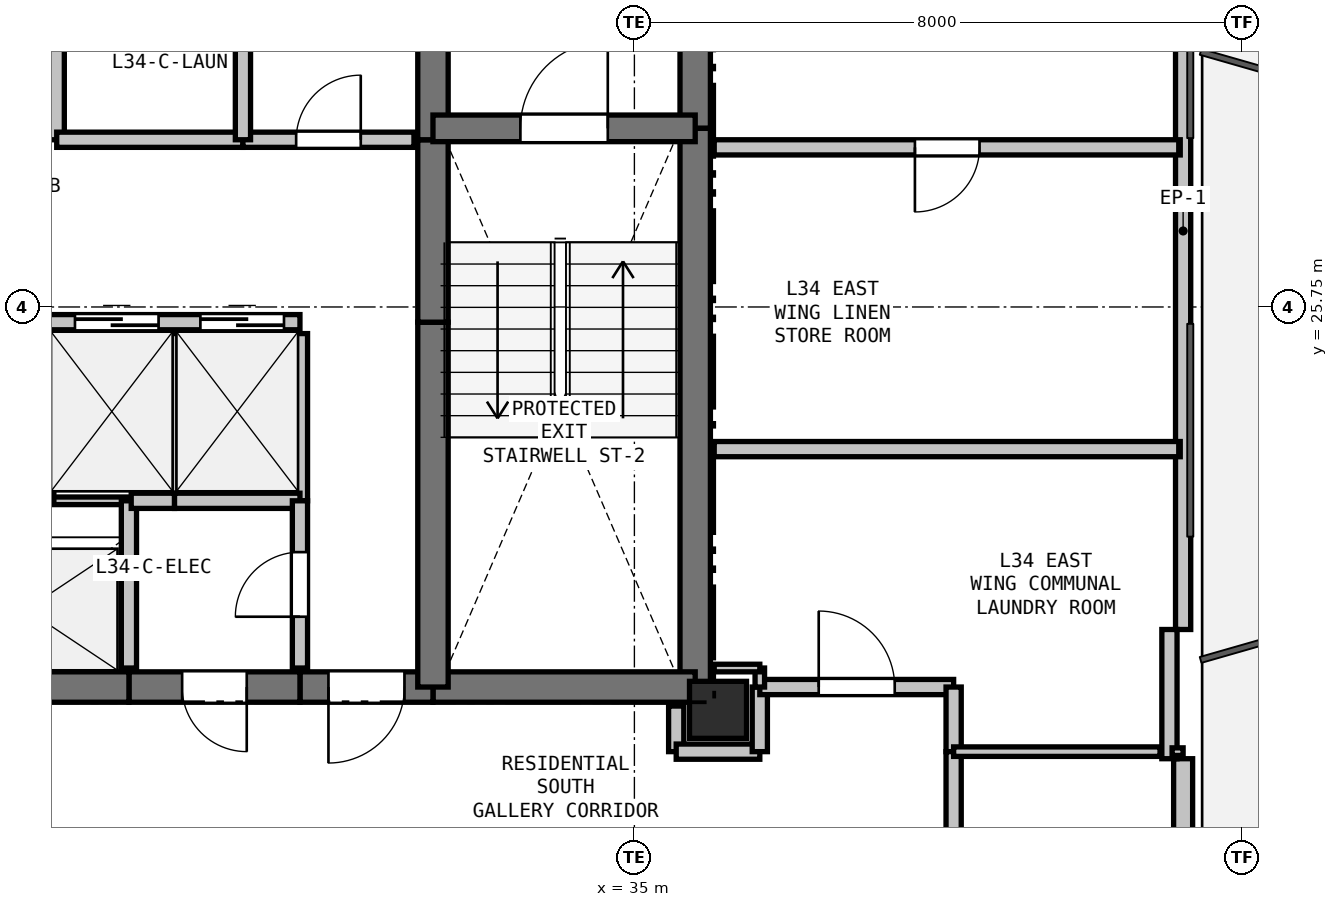
"""IFC4 building model, lengths in metres.
Left out: names, types, materials, properties, quantities, classifications, styles, units other than length and angle.
Written with IfcOpenShell. Run it as: python <this file> out.ifc"""

import sys

from ifc_helpers import new_model, si_unit, direction, frame, frame_2d, origin, origin_2d, place, context, subcontext, project, spatial, rectangle, extrude, element, fill, save


model = new_model("IFC4")
c1 = context("Model", 3, precision=1e-05, world=origin(), true_north=direction((0.0, 1.0)))
c2 = subcontext(c1, "Body", "Model", "MODEL_VIEW")
j1 = project(units=[si_unit("LENGTHUNIT", "METRE"), si_unit("PLANEANGLEUNIT", "RADIAN")], contexts=[c1])
p1 = place(None, origin())
s1 = spatial("IfcSite", under=j1, at=p1, CompositionType="ELEMENT")
p2 = place(p1, origin())
s2 = spatial("IfcBuilding", under=s1, at=p2, CompositionType="ELEMENT")
p3 = place(p2, frame((0.0, 0.0, 124.5)))
s3 = spatial("IfcBuildingStorey", under=s2, at=p3, CompositionType="ELEMENT", Elevation=124.5)
p4 = place(p3, frame((36.1, 20.45, 0.0), z_axis=(0.0, 0.0, 1.0), x_axis=(1.0, 0.0, 0.0)))
e1 = element("IfcColumn", 1, at=p4, inside=s3, PredefinedType="COLUMN", context=c2, shape_type="SweptSolid", body=[
    extrude(rectangle(XDim=0.75, YDim=0.75, at=origin_2d()), origin(), (0.0, 0.0, 1.0), 3.3),
])
p5 = place(p3, frame((42.219, 31.993, 0.0), z_axis=(0.0, 0.0, 1.0), x_axis=(0.0, -1.0, 0.0)))
e2 = element("IfcWall", 2, at=p5, inside=s3, PredefinedType="PARAPET", context=c2, shape_type="SweptSolid", body=[
    extrude(rectangle(XDim=10.486, YDim=0.2, at=frame_2d((5.243, 0.0))), origin(), (0.0, 0.0, 1.0), 0.2),
])
p6 = place(p3, frame((42.219, 19.807, 0.0), z_axis=(0.0, 0.0, 1.0), x_axis=(0.0, -1.0, 0.0)))
e3 = element("IfcWall", 3, at=p6, inside=s3, PredefinedType="SOLIDWALL", context=c2, shape_type="SweptSolid", body=[
    extrude(rectangle(XDim=11.186, YDim=0.25, at=frame_2d((5.593, 0.0))), origin(), (0.0, 0.0, 1.0), 2.68),
])
p7 = place(p6, frame((9.277, 0.0, 0.9)))
e4 = element("IfcOpeningElement", 4, at=p7, cuts=e3, PredefinedType="OPENING", context=c2, shape_type="SweptSolid", body=[
    extrude(rectangle(XDim=1.2, YDim=1.4, at=frame_2d((0.6, 0.7))), frame((0.0, 0.135, 0.0), z_axis=(0.0, -1.0, 0.0), x_axis=(1.0, 0.0, 0.0)), (0.0, 0.0, 1.0), 0.27),
])
p8 = place(p3, frame((42.039, 21.507, 0.0), z_axis=(0.0, 0.0, 1.0), x_axis=(0.0, -1.0, 0.0)))
e5 = element("IfcWall", 5, at=p8, inside=s3, PredefinedType="PARAPET", context=c2, shape_type="SweptSolid", body=[
    extrude(rectangle(XDim=1.7, YDim=0.2, at=frame_2d((0.85, 0.0))), origin(), (0.0, 0.0, 1.0), 2.68),
])
p9 = place(p3, frame((35.8, 32.75, 0.0), z_axis=(0.0, 0.0, 1.0), x_axis=(0.0, -1.0, 0.0)))
e6 = element("IfcWall", 6, at=p9, inside=s3, PredefinedType="SHEAR", context=c2, shape_type="SweptSolid", body=[
    extrude(rectangle(XDim=4.65, YDim=0.4, at=frame_2d((2.325, 0.0))), origin(), (0.0, 0.0, 1.0), 3.06),
])
p10 = place(p3, frame((35.8, 28.1, 0.0), z_axis=(0.0, 0.0, 1.0), x_axis=(0.0, -1.0, 0.0)))
e7 = element("IfcWall", 7, at=p10, inside=s3, PredefinedType="SHEAR", context=c2, shape_type="SweptSolid", body=[
    extrude(rectangle(XDim=7.35, YDim=0.4, at=frame_2d((3.675, 0.0))), origin(), (0.0, 0.0, 1.0), 3.06),
])
p11 = place(p3, frame((35.8, 20.75, 0.0), z_axis=(0.0, 0.0, 1.0), x_axis=(-1.0, 0.0, 0.0)))
e8 = element("IfcWall", 8, at=p11, inside=s3, PredefinedType="SHEAR", context=c2, shape_type="SweptSolid", body=[
    extrude(rectangle(XDim=3.45, YDim=0.4, at=frame_2d((1.725, 0.0))), origin(), (0.0, 0.0, 1.0), 3.06),
])
p12 = place(p3, frame((32.35, 20.75, 0.0), z_axis=(0.0, 0.0, 1.0), x_axis=(-1.0, 0.0, 0.0)))
e9 = element("IfcWall", 9, at=p12, inside=s3, PredefinedType="SHEAR", context=c2, shape_type="SweptSolid", body=[
    extrude(rectangle(XDim=1.75, YDim=0.4, at=frame_2d((0.875, 0.0))), origin(), (0.0, 0.0, 1.0), 3.06),
])
p13 = place(p12, frame((0.375, 0.0, 0.0)))
e10 = element("IfcOpeningElement", 10, at=p13, cuts=e9, PredefinedType="OPENING", context=c2, shape_type="SweptSolid", body=[
    extrude(rectangle(XDim=1.0, YDim=2.15, at=frame_2d((0.5, 1.075))), frame((0.0, 0.21, 0.0), z_axis=(0.0, -1.0, 0.0), x_axis=(1.0, 0.0, 0.0)), (0.0, 0.0, 1.0), 0.42),
])
p14 = place(p3, frame((30.6, 20.75, 0.0), z_axis=(0.0, 0.0, 1.0), x_axis=(-1.0, 0.0, 0.0)))
e11 = element("IfcWall", 11, at=p14, inside=s3, PredefinedType="SHEAR", context=c2, shape_type="SweptSolid", body=[
    extrude(rectangle(XDim=2.25, YDim=0.4, at=frame_2d((1.125, 0.0))), origin(), (0.0, 0.0, 1.0), 3.06),
])
p15 = place(p14, frame((0.7, 0.0, 0.0)))
e12 = element("IfcOpeningElement", 12, at=p15, cuts=e11, PredefinedType="OPENING", context=c2, shape_type="SweptSolid", body=[
    extrude(rectangle(XDim=0.85, YDim=2.1, at=frame_2d((0.425, 1.05))), frame((0.0, 0.21, 0.0), z_axis=(0.0, -1.0, 0.0), x_axis=(1.0, 0.0, 0.0)), (0.0, 0.0, 1.0), 0.42),
])
p16 = place(p3, frame((28.35, 20.75, 0.0), z_axis=(0.0, 0.0, 1.0), x_axis=(-1.0, 0.0, 0.0)))
e13 = element("IfcWall", 13, at=p16, inside=s3, PredefinedType="SHEAR", context=c2, shape_type="SweptSolid", body=[
    extrude(rectangle(XDim=2.7, YDim=0.4, at=frame_2d((1.35, 0.0))), origin(), (0.0, 0.0, 1.0), 3.06),
])
p17 = place(p3, frame((32.35, 20.75, 0.0), z_axis=(0.0, 0.0, 1.0), x_axis=(0.0, 1.0, 0.0)))
e14 = element("IfcWall", 14, at=p17, inside=s3, PredefinedType="SHEAR", context=c2, shape_type="SweptSolid", body=[
    extrude(rectangle(XDim=4.8, YDim=0.4, at=frame_2d((2.4, 0.0))), origin(), (0.0, 0.0, 1.0), 3.06),
])
p18 = place(p3, frame((32.35, 25.55, 0.0), z_axis=(0.0, 0.0, 1.0), x_axis=(0.0, 1.0, 0.0)))
e15 = element("IfcWall", 15, at=p18, inside=s3, PredefinedType="SHEAR", context=c2, shape_type="SweptSolid", body=[
    extrude(rectangle(XDim=2.4, YDim=0.4, at=frame_2d((1.2, 0.0))), origin(), (0.0, 0.0, 1.0), 3.06),
])
p19 = place(p3, frame((32.35, 27.95, 0.0), z_axis=(0.0, 0.0, 1.0), x_axis=(0.0, 1.0, 0.0)))
e16 = element("IfcWall", 16, at=p19, inside=s3, PredefinedType="SHEAR", context=c2, shape_type="SweptSolid", body=[
    extrude(rectangle(XDim=2.8, YDim=0.4, at=frame_2d((1.4, 0.0))), origin(), (0.0, 0.0, 1.0), 3.06),
])
p20 = place(p3, frame((32.35, 28.1, 0.0), z_axis=(0.0, 0.0, 1.0), x_axis=(1.0, 0.0, 0.0)))
e17 = element("IfcWall", 17, at=p20, inside=s3, PredefinedType="SHEAR", context=c2, shape_type="SweptSolid", body=[
    extrude(rectangle(XDim=3.45, YDim=0.35, at=frame_2d((1.725, 0.0))), origin(), (0.0, 0.0, 1.0), 3.06),
])
p21 = place(p20, frame((1.15, 0.0, 0.0)))
e18 = element("IfcOpeningElement", 18, at=p21, cuts=e17, PredefinedType="OPENING", context=c2, shape_type="SweptSolid", body=[
    extrude(rectangle(XDim=1.15, YDim=2.15, at=frame_2d((0.575, 1.075))), frame((0.0, 0.185, 0.0), z_axis=(0.0, -1.0, 0.0), x_axis=(1.0, 0.0, 0.0)), (0.0, 0.0, 1.0), 0.37),
])
p22 = place(p3, frame((25.65, 25.55, 0.0), z_axis=(0.0, 0.0, 1.0), x_axis=(1.0, 0.0, 0.0)))
e19 = element("IfcWall", 19, at=p22, inside=s3, PredefinedType="PARTITIONING", context=c2, shape_type="SweptSolid", body=[
    extrude(rectangle(XDim=4.95, YDim=0.2, at=frame_2d((2.475, 0.0))), origin(), (0.0, 0.0, 1.0), 3.06),
])
p23 = place(p22, frame((0.34, 0.0, 0.0)))
e20 = element("IfcOpeningElement", 20, at=p23, cuts=e19, PredefinedType="OPENING", context=c2, shape_type="SweptSolid", body=[
    extrude(rectangle(XDim=1.1, YDim=2.15, at=frame_2d((0.55, 1.075))), frame((0.0, 0.11, 0.0), z_axis=(0.0, -1.0, 0.0), x_axis=(1.0, 0.0, 0.0)), (0.0, 0.0, 1.0), 0.22),
])
p24 = place(p22, frame((1.99, 0.0, 0.0)))
e21 = element("IfcOpeningElement", 21, at=p24, cuts=e19, PredefinedType="OPENING", context=c2, shape_type="SweptSolid", body=[
    extrude(rectangle(XDim=1.1, YDim=2.15, at=frame_2d((0.55, 1.075))), frame((0.0, 0.11, 0.0), z_axis=(0.0, -1.0, 0.0), x_axis=(1.0, 0.0, 0.0)), (0.0, 0.0, 1.0), 0.22),
])
p25 = place(p22, frame((3.64, 0.0, 0.0)))
e22 = element("IfcOpeningElement", 22, at=p25, cuts=e19, PredefinedType="OPENING", context=c2, shape_type="SweptSolid", body=[
    extrude(rectangle(XDim=1.1, YDim=2.15, at=frame_2d((0.55, 1.075))), frame((0.0, 0.11, 0.0), z_axis=(0.0, -1.0, 0.0), x_axis=(1.0, 0.0, 0.0)), (0.0, 0.0, 1.0), 0.22),
])
p26 = place(p3, frame((27.3, 23.2, 0.0), z_axis=(0.0, 0.0, 1.0), x_axis=(1.0, 0.0, 0.0)))
e23 = element("IfcWall", 23, at=p26, inside=s3, PredefinedType="PARTITIONING", context=c2, shape_type="SweptSolid", body=[
    extrude(rectangle(XDim=1.05, YDim=0.1, at=frame_2d((0.525, 0.0))), origin(), (0.0, 0.0, 1.0), 3.06),
])
p27 = place(p3, frame((28.35, 23.2, 0.0), z_axis=(0.0, 0.0, 1.0), x_axis=(0.0, -1.0, 0.0)))
e24 = element("IfcWall", 24, at=p27, inside=s3, PredefinedType="PARTITIONING", context=c2, shape_type="SweptSolid", body=[
    extrude(rectangle(XDim=2.2, YDim=0.2, at=frame_2d((1.1, 0.0))), origin(), (0.0, 0.0, 1.0), 3.06),
])
p28 = place(p3, frame((27.3, 25.4, 0.0), z_axis=(0.0, 0.0, 1.0), x_axis=(0.0, -1.0, 0.0)))
e25 = element("IfcWall", 25, at=p28, inside=s3, PredefinedType="PARTITIONING", context=c2, shape_type="SweptSolid", body=[
    extrude(rectangle(XDim=2.2, YDim=0.125, at=frame_2d((1.1, 0.0))), origin(), (0.0, 0.0, 1.0), 3.06),
])
p29 = place(p3, frame((28.95, 25.4, 0.0), z_axis=(0.0, 0.0, 1.0), x_axis=(0.0, -1.0, 0.0)))
e26 = element("IfcWall", 26, at=p29, inside=s3, PredefinedType="PARTITIONING", context=c2, shape_type="SweptSolid", body=[
    extrude(rectangle(XDim=2.2, YDim=0.1, at=frame_2d((1.1, 0.0))), origin(), (0.0, 0.0, 1.0), 3.06),
])
p30 = place(p3, frame((28.95, 23.2, 0.0), z_axis=(0.0, 0.0, 1.0), x_axis=(-1.0, 0.0, 0.0)))
e27 = element("IfcWall", 27, at=p30, inside=s3, PredefinedType="PARTITIONING", context=c2, shape_type="SweptSolid", body=[
    extrude(rectangle(XDim=0.57, YDim=0.2, at=frame_2d((0.285, 0.0))), origin(), (0.0, 0.0, 1.0), 3.06),
])
p31 = place(p3, frame((30.6, 25.4, 0.0), z_axis=(0.0, 0.0, 1.0), x_axis=(0.0, -1.0, 0.0)))
e28 = element("IfcWall", 28, at=p31, inside=s3, PredefinedType="PARTITIONING", context=c2, shape_type="SweptSolid", body=[
    extrude(rectangle(XDim=2.2, YDim=0.2, at=frame_2d((1.1, 0.0))), origin(), (0.0, 0.0, 1.0), 3.06),
])
p32 = place(p3, frame((30.6, 23.2, 0.0), z_axis=(0.0, 0.0, 1.0), x_axis=(-1.0, 0.0, 0.0)))
e29 = element("IfcWall", 29, at=p32, inside=s3, PredefinedType="PARTITIONING", context=c2, shape_type="SweptSolid", body=[
    extrude(rectangle(XDim=1.65, YDim=0.2, at=frame_2d((0.825, 0.0))), origin(), (0.0, 0.0, 1.0), 3.06),
])
p33 = place(p3, frame((30.6, 21.0, 0.0), z_axis=(0.0, 0.0, 1.0), x_axis=(0.0, 1.0, 0.0)))
e30 = element("IfcWall", 30, at=p33, inside=s3, PredefinedType="PARTITIONING", context=c2, shape_type="SweptSolid", body=[
    extrude(rectangle(XDim=2.2, YDim=0.2, at=frame_2d((1.1, 0.0))), origin(), (0.0, 0.0, 1.0), 3.06),
])
p34 = place(p33, frame((0.675, 0.0, 0.0)))
e31 = element("IfcOpeningElement", 31, at=p34, cuts=e30, PredefinedType="OPENING", context=c2, shape_type="SweptSolid", body=[
    extrude(rectangle(XDim=0.85, YDim=2.1, at=frame_2d((0.425, 1.05))), frame((0.0, 0.11, 0.0), z_axis=(0.0, -1.0, 0.0), x_axis=(1.0, 0.0, 0.0)), (0.0, 0.0, 1.0), 0.22),
])
p35 = place(p3, frame((27.4, 32.5, 0.0), z_axis=(0.0, 0.0, 1.0), x_axis=(0.0, -1.0, 0.0)))
e32 = element("IfcWall", 32, at=p35, inside=s3, PredefinedType="PARTITIONING", context=c2, shape_type="SweptSolid", body=[
    extrude(rectangle(XDim=4.55, YDim=0.2, at=frame_2d((2.275, 0.0))), origin(), (0.0, 0.0, 1.0), 3.06),
])
p36 = place(p35, frame((1.775, 0.0, 0.0)))
e33 = element("IfcOpeningElement", 33, at=p36, cuts=e32, PredefinedType="OPENING", context=c2, shape_type="SweptSolid", body=[
    extrude(rectangle(XDim=1.0, YDim=2.15, at=frame_2d((0.5, 1.075))), frame((0.0, 0.11, 0.0), z_axis=(0.0, -1.0, 0.0), x_axis=(1.0, 0.0, 0.0)), (0.0, 0.0, 1.0), 0.22),
])
p37 = place(p3, frame((27.4, 27.95, 0.0), z_axis=(0.0, 0.0, 1.0), x_axis=(1.0, 0.0, 0.0)))
e34 = element("IfcWall", 34, at=p37, inside=s3, PredefinedType="PARTITIONING", context=c2, shape_type="SweptSolid", body=[
    extrude(rectangle(XDim=2.45, YDim=0.2, at=frame_2d((1.225, 0.0))), origin(), (0.0, 0.0, 1.0), 3.06),
])
p38 = place(p3, frame((29.85, 27.95, 0.0), z_axis=(0.0, 0.0, 1.0), x_axis=(1.0, 0.0, 0.0)))
e35 = element("IfcWall", 35, at=p38, inside=s3, PredefinedType="PARTITIONING", context=c2, shape_type="SweptSolid", body=[
    extrude(rectangle(XDim=2.25, YDim=0.2, at=frame_2d((1.125, 0.0))), origin(), (0.0, 0.0, 1.0), 3.06),
])
p39 = place(p38, frame((0.7, 0.0, 0.0)))
e36 = element("IfcOpeningElement", 36, at=p39, cuts=e35, PredefinedType="OPENING", context=c2, shape_type="SweptSolid", body=[
    extrude(rectangle(XDim=0.85, YDim=2.1, at=frame_2d((0.425, 1.05))), frame((0.0, 0.11, 0.0), z_axis=(0.0, -1.0, 0.0), x_axis=(1.0, 0.0, 0.0)), (0.0, 0.0, 1.0), 0.22),
])
p40 = place(p3, frame((35.55, 20.5, 0.0), z_axis=(0.0, 0.0, 1.0), x_axis=(0.0, -1.0, 0.0)))
e37 = element("IfcWall", 37, at=p40, inside=s3, PredefinedType="PARTITIONING", context=c2, shape_type="SweptSolid", body=[
    extrude(rectangle(XDim=0.6, YDim=0.2, at=frame_2d((0.3, 0.0))), origin(), (0.0, 0.0, 1.0), 2.508),
])
p41 = place(p3, frame((35.55, 19.9, 0.0), z_axis=(0.0, 0.0, 1.0), x_axis=(1.0, 0.0, 0.0)))
e38 = element("IfcWall", 38, at=p41, inside=s3, PredefinedType="PARTITIONING", context=c2, shape_type="SweptSolid", body=[
    extrude(rectangle(XDim=1.1, YDim=0.2, at=frame_2d((0.55, 0.0))), origin(), (0.0, 0.0, 1.0), 2.433),
])
p42 = place(p3, frame((36.65, 19.9, 0.0), z_axis=(0.0, 0.0, 1.0), x_axis=(0.0, 1.0, 0.0)))
e39 = element("IfcWall", 39, at=p42, inside=s3, PredefinedType="PARTITIONING", context=c2, shape_type="SweptSolid", body=[
    extrude(rectangle(XDim=0.85, YDim=0.2, at=frame_2d((0.425, 0.0))), origin(), (0.0, 0.0, 1.0), 3.06),
])
p43 = place(p3, frame((36.65, 20.75, 0.0), z_axis=(0.0, 0.0, 1.0), x_axis=(1.0, 0.0, 0.0)))
e40 = element("IfcWall", 40, at=p43, inside=s3, PredefinedType="PARTITIONING", context=c2, shape_type="SweptSolid", body=[
    extrude(rectangle(XDim=2.55, YDim=0.2, at=frame_2d((1.275, 0.0))), origin(), (0.0, 0.0, 1.0), 3.06),
])
p44 = place(p43, frame((0.775, 0.0, 0.0)))
e41 = element("IfcOpeningElement", 41, at=p44, cuts=e40, PredefinedType="OPENING", context=c2, shape_type="SweptSolid", body=[
    extrude(rectangle(XDim=1.0, YDim=2.15, at=frame_2d((0.5, 1.075))), frame((0.0, 0.11, 0.0), z_axis=(0.0, -1.0, 0.0), x_axis=(1.0, 0.0, 0.0)), (0.0, 0.0, 1.0), 0.22),
])
p45 = place(p3, frame((39.2, 20.75, 0.0), z_axis=(0.0, 0.0, 1.0), x_axis=(0.0, -1.0, 0.0)))
e42 = element("IfcWall", 42, at=p45, inside=s3, PredefinedType="PARTITIONING", context=c2, shape_type="SweptSolid", body=[
    extrude(rectangle(XDim=0.85, YDim=0.2, at=frame_2d((0.425, 0.0))), origin(), (0.0, 0.0, 1.0), 3.06),
])
p46 = place(p3, frame((39.2, 19.9, 0.0), z_axis=(0.0, 0.0, 1.0), x_axis=(0.0, -1.0, 0.0)))
e43 = element("IfcWall", 43, at=p46, inside=s3, PredefinedType="PARTITIONING", context=c2, shape_type="SweptSolid", body=[
    extrude(rectangle(XDim=1.75, YDim=0.2, at=frame_2d((0.875, 0.0))), origin(), (0.0, 0.0, 1.0), 3.06),
])
p47 = place(p3, frame((29.85, 30.3, 0.0), z_axis=(0.0, 0.0, 1.0), x_axis=(0.0, -1.0, 0.0)))
e44 = element("IfcWall", 44, at=p47, inside=s3, PredefinedType="PARTITIONING", context=c2, shape_type="SweptSolid", body=[
    extrude(rectangle(XDim=2.35, YDim=0.2, at=frame_2d((1.175, 0.0))), origin(), (0.0, 0.0, 1.0), 3.06),
])
p48 = place(p3, frame((42.181, 27.85, 0.0), z_axis=(0.0, 0.0, 1.0), x_axis=(-1.0, 0.0, 0.0)))
e45 = element("IfcWall", 45, at=p48, inside=s3, PredefinedType="PARTITIONING", context=c2, shape_type="SweptSolid", body=[
    extrude(rectangle(XDim=6.131, YDim=0.2, at=frame_2d((3.065, 0.0))), origin(), (0.0, 0.0, 1.0), 2.365),
])
p49 = place(p48, frame((2.641, 0.0, 0.0)))
e46 = element("IfcOpeningElement", 46, at=p49, cuts=e45, PredefinedType="OPENING", context=c2, shape_type="SweptSolid", body=[
    extrude(rectangle(XDim=0.85, YDim=2.1, at=frame_2d((0.425, 1.05))), frame((0.0, 0.11, 0.0), z_axis=(0.0, -1.0, 0.0), x_axis=(1.0, 0.0, 0.0)), (0.0, 0.0, 1.0), 0.22),
])
p50 = place(p3, frame((36.65, 20.75, 0.0), z_axis=(0.0, 0.0, 1.0), x_axis=(0.0, 1.0, 0.0)))
e47 = element("IfcWall", 47, at=p50, inside=s3, PredefinedType="PARTITIONING", context=c2, shape_type="SweptSolid", body=[
    extrude(rectangle(XDim=0.25, YDim=0.125, at=frame_2d((0.125, 0.0))), origin(), (0.0, 0.0, 1.0), 3.06),
])
p51 = place(p3, frame((36.65, 21.0, 0.0), z_axis=(0.0, 0.0, 1.0), x_axis=(-1.0, 0.0, 0.0)))
e48 = element("IfcWall", 48, at=p51, inside=s3, PredefinedType="PARTITIONING", context=c2, shape_type="SweptSolid", body=[
    extrude(rectangle(XDim=0.6, YDim=0.1, at=frame_2d((0.3, 0.0))), origin(), (0.0, 0.0, 1.0), 2.508),
])
p52 = place(p3, frame((36.05, 23.88, 0.0), z_axis=(0.0, 0.0, 1.0), x_axis=(1.0, 0.0, 0.0)))
e49 = element("IfcWall", 49, at=p52, inside=s3, PredefinedType="PARTITIONING", context=c2, shape_type="SweptSolid", body=[
    extrude(rectangle(XDim=6.131, YDim=0.2, at=frame_2d((3.065, 0.0))), origin(), (0.0, 0.0, 1.0), 2.365),
])
p53 = place(p3, frame((42.219, 19.9, 0.0), z_axis=(0.0, 0.0, 1.0), x_axis=(-1.0, 0.0, 0.0)))
e50 = element("IfcWall", 50, at=p53, inside=s3, PredefinedType="PARTITIONING", context=c2, shape_type="SweptSolid", body=[
    extrude(rectangle(XDim=0.145, YDim=0.1, at=frame_2d((0.072, 0.0))), origin(), (0.0, 0.0, 1.0), 3.06),
])
p54 = place(p3, frame((41.915, 19.9, 0.0), z_axis=(0.0, 0.0, 1.0), x_axis=(-1.0, 0.0, 0.0)))
e51 = element("IfcWall", 51, at=p54, inside=s3, PredefinedType="PARTITIONING", context=c2, shape_type="SweptSolid", body=[
    extrude(rectangle(XDim=2.715, YDim=0.125, at=frame_2d((1.358, 0.0))), origin(), (0.0, 0.0, 1.0), 2.365),
])
p55 = place(p24, origin())
e52 = element("IfcDoor", 52, at=p55, inside=s3, OperationType="SLIDING_TO_LEFT", PredefinedType="DOOR", context=c2, shape_type="SweptSolid", body=[
    extrude(rectangle(XDim=1.1, YDim=2.15, at=frame_2d((0.55, 1.075))), frame((0.0, 0.025, 0.0), z_axis=(0.0, -1.0, 0.0), x_axis=(1.0, 0.0, 0.0)), (0.0, 0.0, 1.0), 0.05),
])
fill(e21, e52)
p56 = place(p25, origin())
e53 = element("IfcDoor", 53, at=p56, inside=s3, OperationType="SLIDING_TO_LEFT", PredefinedType="DOOR", context=c2, shape_type="SweptSolid", body=[
    extrude(rectangle(XDim=1.1, YDim=2.15, at=frame_2d((0.55, 1.075))), frame((0.0, 0.025, 0.0), z_axis=(0.0, -1.0, 0.0), x_axis=(1.0, 0.0, 0.0)), (0.0, 0.0, 1.0), 0.05),
])
fill(e22, e53)
p57 = place(p13, origin())
e54 = element("IfcDoor", 54, at=p57, inside=s3, OperationType="SINGLE_SWING_RIGHT", PredefinedType="DOOR", context=c2, shape_type="SweptSolid", body=[
    extrude(rectangle(XDim=1.0, YDim=2.15, at=frame_2d((0.5, 1.075))), frame((0.0, 0.025, 0.0), z_axis=(0.0, -1.0, 0.0), x_axis=(1.0, 0.0, 0.0)), (0.0, 0.0, 1.0), 0.05),
])
fill(e10, e54)
p58 = place(p21, origin())
e55 = element("IfcDoor", 55, at=p58, inside=s3, OperationType="SINGLE_SWING_RIGHT", PredefinedType="DOOR", context=c2, shape_type="SweptSolid", body=[
    extrude(rectangle(XDim=1.15, YDim=2.15, at=frame_2d((0.575, 1.075))), frame((0.0, 0.025, 0.0), z_axis=(0.0, -1.0, 0.0), x_axis=(1.0, 0.0, 0.0)), (0.0, 0.0, 1.0), 0.05),
])
fill(e18, e55)
p59 = place(p39, origin())
e56 = element("IfcDoor", 56, at=p59, inside=s3, OperationType="SINGLE_SWING_RIGHT", PredefinedType="DOOR", context=c2, shape_type="SweptSolid", body=[
    extrude(rectangle(XDim=0.85, YDim=2.1, at=frame_2d((0.425, 1.05))), frame((0.0, 0.025, 0.0), z_axis=(0.0, -1.0, 0.0), x_axis=(1.0, 0.0, 0.0)), (0.0, 0.0, 1.0), 0.05),
])
fill(e36, e56)
p60 = place(p34, origin())
e57 = element("IfcDoor", 57, at=p60, inside=s3, OperationType="SINGLE_SWING_LEFT", PredefinedType="DOOR", context=c2, shape_type="SweptSolid", body=[
    extrude(rectangle(XDim=0.85, YDim=2.1, at=frame_2d((0.425, 1.05))), frame((0.0, 0.025, 0.0), z_axis=(0.0, -1.0, 0.0), x_axis=(1.0, 0.0, 0.0)), (0.0, 0.0, 1.0), 0.05),
])
fill(e31, e57)
p61 = place(p15, origin())
e58 = element("IfcDoor", 58, at=p61, inside=s3, OperationType="SINGLE_SWING_LEFT", PredefinedType="DOOR", context=c2, shape_type="SweptSolid", body=[
    extrude(rectangle(XDim=0.85, YDim=2.1, at=frame_2d((0.425, 1.05))), frame((0.0, 0.025, 0.0), z_axis=(0.0, -1.0, 0.0), x_axis=(1.0, 0.0, 0.0)), (0.0, 0.0, 1.0), 0.05),
])
fill(e12, e58)
p62 = place(p44, origin())
e59 = element("IfcDoor", 59, at=p62, inside=s3, OperationType="SINGLE_SWING_LEFT", PredefinedType="DOOR", context=c2, shape_type="SweptSolid", body=[
    extrude(rectangle(XDim=1.0, YDim=2.15, at=frame_2d((0.5, 1.075))), frame((0.0, 0.025, 0.0), z_axis=(0.0, -1.0, 0.0), x_axis=(1.0, 0.0, 0.0)), (0.0, 0.0, 1.0), 0.05),
])
fill(e41, e59)
p63 = place(p49, origin())
e60 = element("IfcDoor", 60, at=p63, inside=s3, OperationType="SINGLE_SWING_RIGHT", PredefinedType="DOOR", context=c2, shape_type="SweptSolid", body=[
    extrude(rectangle(XDim=0.85, YDim=2.1, at=frame_2d((0.425, 1.05))), frame((0.0, 0.025, 0.0), z_axis=(0.0, -1.0, 0.0), x_axis=(1.0, 0.0, 0.0)), (0.0, 0.0, 1.0), 0.05),
])
fill(e46, e60)
save(model, sys.argv[1])
